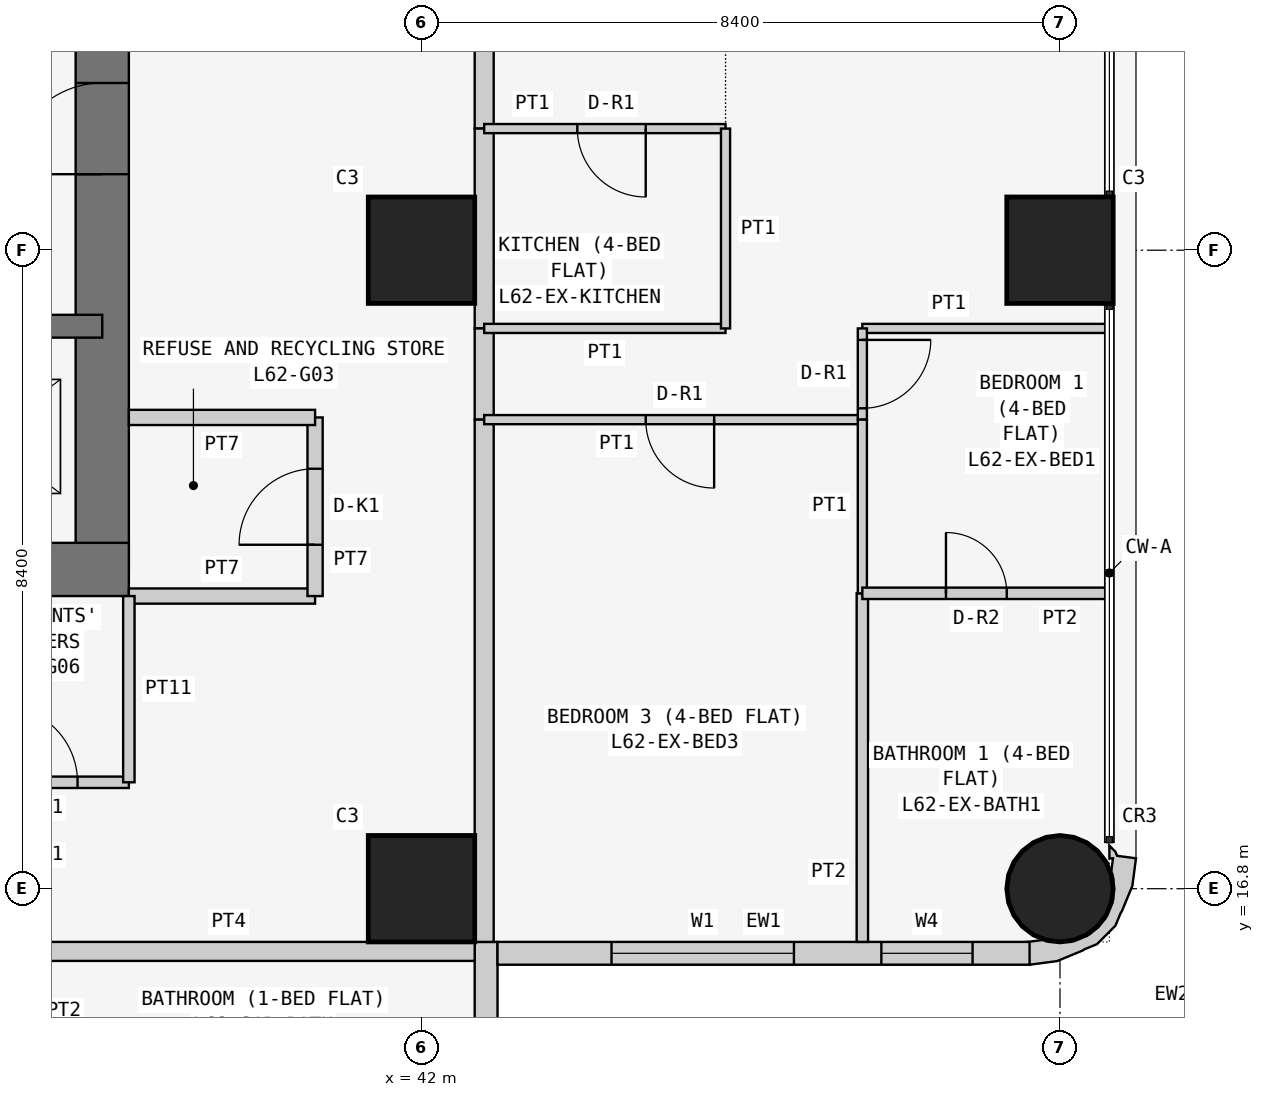
"""IFC4 building model, lengths in metres.
Left out: names, types, materials, properties, quantities, classifications, styles, units other than length and angle.
Written with IfcOpenShell. Run it as: python <this file> out.ifc"""

import sys

from ifc_helpers import new_model, si_unit, direction, frame, frame_2d, origin, origin_2d, place, context, subcontext, project, spatial, polyline, rectangle, circle, outline, extrude, element, fill, save


model = new_model("IFC4")
c1 = context("Model", 3, precision=1e-05, world=origin(), true_north=direction((0.0, 1.0)))
c2 = subcontext(c1, "Body", "Model", "MODEL_VIEW")
j1 = project(units=[si_unit("LENGTHUNIT", "METRE"), si_unit("PLANEANGLEUNIT", "RADIAN")], contexts=[c1])
p1 = place(None, origin())
s1 = spatial("IfcSite", under=j1, at=p1, CompositionType="ELEMENT")
p2 = place(p1, origin())
s2 = spatial("IfcBuilding", under=s1, at=p2, CompositionType="ELEMENT")
p3 = place(p2, frame((0.0, 0.0, 237.3)))
s3 = spatial("IfcBuildingStorey", under=s2, at=p3, CompositionType="ELEMENT", Elevation=237.3)
for number, where, z_axis, x_axis in (
    (1, (42.0, 16.8, 0.0), (0.0, 0.0, 1.0), (1.0, 0.0, 0.0)),
    (2, (42.0, 25.2, 0.0), (0.0, 0.0, 1.0), (1.0, 0.0, 0.0)),
):
    element("IfcColumn", number, at=place(p3, frame(where, z_axis=z_axis, x_axis=x_axis)), inside=s3, PredefinedType="COLUMN", context=c2, shape_type="SweptSolid", body=[
        extrude(rectangle(XDim=1.4, YDim=1.4, at=origin_2d()), origin(), (0.0, 0.0, 1.0), 3.6),
    ])
p4 = place(p3, frame((50.4, 16.8, 0.0), z_axis=(0.0, 0.0, 1.0), x_axis=(1.0, 0.0, 0.0)))
e3 = element("IfcColumn", 3, at=p4, inside=s3, PredefinedType="COLUMN", context=c2, shape_type="SweptSolid", body=[
    extrude(circle(Radius=0.7, at=origin_2d()), origin(), (0.0, 0.0, 1.0), 3.6),
])
p5 = place(p3, frame((50.4, 25.2, 0.0), z_axis=(0.0, 0.0, 1.0), x_axis=(1.0, 0.0, 0.0)))
e4 = element("IfcColumn", 4, at=p5, inside=s3, PredefinedType="COLUMN", context=c2, shape_type="SweptSolid", body=[
    extrude(rectangle(XDim=1.4, YDim=1.4, at=origin_2d()), origin(), (0.0, 0.0, 1.0), 3.6),
])
p6 = place(p3, frame((21.0, 21.0, 0.0), z_axis=(0.0, 0.0, 1.0), x_axis=(1.0, 0.0, 0.0)))
e5 = element("IfcWall", 5, at=p6, inside=s3, PredefinedType="SHEAR", context=c2, shape_type="SweptSolid", body=[
    extrude(rectangle(XDim=17.15, YDim=0.7, at=frame_2d((8.575, 0.0))), origin(), (0.0, 0.0, 1.0), 3.6),
])
p7 = place(p3, frame((37.8, 21.0, 0.0), z_axis=(0.0, 0.0, 1.0), x_axis=(0.0, 1.0, 0.0)))
e6 = element("IfcWall", 6, at=p7, inside=s3, PredefinedType="SHEAR", context=c2, shape_type="SweptSolid", body=[
    extrude(rectangle(XDim=17.15, YDim=0.7, at=frame_2d((8.575, 0.0))), origin(), (0.0, 0.0, 1.0), 3.6),
])
p8 = place(p7, frame((5.2, 0.0, 0.0)))
e7 = element("IfcOpeningElement", 7, at=p8, cuts=e6, PredefinedType="OPENING", context=c2, shape_type="SweptSolid", body=[
    extrude(rectangle(XDim=1.2, YDim=2.1, at=frame_2d((0.6, 1.05))), frame((0.0, 0.36, 0.0), z_axis=(0.0, -1.0, 0.0), x_axis=(1.0, 0.0, 0.0)), (0.0, 0.0, 1.0), 0.72),
])
p9 = place(p3, frame((26.6, 24.2, 0.0), z_axis=(0.0, 0.0, 1.0), x_axis=(1.0, 0.0, 0.0)))
e8 = element("IfcWall", 8, at=p9, inside=s3, PredefinedType="SHEAR", context=c2, shape_type="SweptSolid", body=[
    extrude(rectangle(XDim=11.2, YDim=0.3, at=frame_2d((5.6, 0.0))), origin(), (0.0, 0.0, 1.0), 3.6),
])
p10 = place(p9, frame((0.913, 0.0, 0.0)))
e9 = element("IfcOpeningElement", 9, at=p10, cuts=e8, PredefinedType="OPENING", context=c2, shape_type="SweptSolid", body=[
    extrude(rectangle(XDim=1.0, YDim=2.1, at=frame_2d((0.5, 1.05))), frame((0.0, 0.16, 0.0), z_axis=(0.0, -1.0, 0.0), x_axis=(1.0, 0.0, 0.0)), (0.0, 0.0, 1.0), 0.32),
])
p11 = place(p9, frame((3.75, 0.0, 0.0)))
e10 = element("IfcOpeningElement", 10, at=p11, cuts=e8, PredefinedType="OPENING", context=c2, shape_type="SweptSolid", body=[
    extrude(rectangle(XDim=0.9, YDim=2.1, at=frame_2d((0.45, 1.05))), frame((0.0, 0.16, 0.0), z_axis=(0.0, -1.0, 0.0), x_axis=(1.0, 0.0, 0.0)), (0.0, 0.0, 1.0), 0.32),
])
p12 = place(p9, frame((6.45, 0.0, 0.0)))
e11 = element("IfcOpeningElement", 11, at=p12, cuts=e8, PredefinedType="OPENING", context=c2, shape_type="SweptSolid", body=[
    extrude(rectangle(XDim=1.1, YDim=2.1, at=frame_2d((0.55, 1.05))), frame((0.0, 0.16, 0.0), z_axis=(0.0, -1.0, 0.0), x_axis=(1.0, 0.0, 0.0)), (0.0, 0.0, 1.0), 0.32),
])
p13 = place(p9, frame((9.1, 0.0, 0.0)))
e12 = element("IfcOpeningElement", 12, at=p13, cuts=e8, PredefinedType="OPENING", context=c2, shape_type="SweptSolid", body=[
    extrude(rectangle(XDim=1.1, YDim=2.1, at=frame_2d((0.55, 1.05))), frame((0.0, 0.16, 0.0), z_axis=(0.0, -1.0, 0.0), x_axis=(1.0, 0.0, 0.0)), (0.0, 0.0, 1.0), 0.32),
])
p14 = place(p3, frame((42.85, 8.8, 0.0), z_axis=(0.0, 0.0, 1.0), x_axis=(0.0, 1.0, 0.0)))
e13 = element("IfcWall", 13, at=p14, inside=s3, PredefinedType="SOLIDWALL", context=c2, shape_type="SweptSolid", body=[
    extrude(rectangle(XDim=7.3, YDim=0.3, at=frame_2d((3.65, 0.0))), origin(), (0.0, 0.0, 1.0), 3.45),
])
p15 = place(p14, frame((3.1, 0.0, 0.9)))
e14 = element("IfcOpeningElement", 14, at=p15, cuts=e13, PredefinedType="OPENING", context=c2, shape_type="SweptSolid", body=[
    extrude(rectangle(XDim=2.4, YDim=1.5, at=frame_2d((1.2, 0.75))), frame((0.0, 0.16, 0.0), z_axis=(0.0, -1.0, 0.0), x_axis=(1.0, 0.0, 0.0)), (0.0, 0.0, 1.0), 0.32),
])
p16 = place(p14, frame((0.75, 0.0, 0.9)))
e15 = element("IfcOpeningElement", 15, at=p16, cuts=e13, PredefinedType="OPENING", context=c2, shape_type="SweptSolid", body=[
    extrude(rectangle(XDim=1.2, YDim=1.5, at=frame_2d((0.6, 0.75))), frame((0.0, 0.16, 0.0), z_axis=(0.0, -1.0, 0.0), x_axis=(1.0, 0.0, 0.0)), (0.0, 0.0, 1.0), 0.32),
])
p17 = place(p3, frame((43.0, 15.95, 0.0), z_axis=(0.0, 0.0, 1.0), x_axis=(1.0, 0.0, 0.0)))
e16 = element("IfcWall", 16, at=p17, inside=s3, PredefinedType="SOLIDWALL", context=c2, shape_type="SweptSolid", body=[
    extrude(rectangle(XDim=7.0, YDim=0.3, at=frame_2d((3.5, 0.0))), origin(), (0.0, 0.0, 1.0), 3.45),
])
p18 = place(p17, frame((1.5, 0.0, 0.9)))
e17 = element("IfcOpeningElement", 17, at=p18, cuts=e16, PredefinedType="OPENING", context=c2, shape_type="SweptSolid", body=[
    extrude(rectangle(XDim=2.4, YDim=1.5, at=frame_2d((1.2, 0.75))), frame((0.0, 0.16, 0.0), z_axis=(0.0, -1.0, 0.0), x_axis=(1.0, 0.0, 0.0)), (0.0, 0.0, 1.0), 0.32),
])
p19 = place(p17, frame((5.05, 0.0, 0.9)))
e18 = element("IfcOpeningElement", 18, at=p19, cuts=e16, PredefinedType="OPENING", context=c2, shape_type="SweptSolid", body=[
    extrude(rectangle(XDim=1.2, YDim=1.5, at=frame_2d((0.6, 0.75))), frame((0.0, 0.16, 0.0), z_axis=(0.0, -1.0, 0.0), x_axis=(1.0, 0.0, 0.0)), (0.0, 0.0, 1.0), 0.32),
])
p20 = place(p3, frame((50.11, 16.076, 0.0), z_axis=(0.0, 0.0, 1.0), x_axis=(0.898030234854, -0.439933741929, 0.0)))
e19 = element("IfcWall", 19, at=p20, inside=s3, PredefinedType="SOLIDWALL", context=c2, shape_type="SweptSolid", body=[
    extrude(outline(polyline([(0.664, 1.577), (0.426, 1.497), (0.382, 1.536), (0.276, 1.572), (0.349, 1.423), (0.392, 1.444), (0.453, 1.261), (0.51, 1.211), (0.632, 0.961), (0.65, 0.683), (0.56, 0.419), (0.375, 0.21), (0.125, 0.087), (0.05, 0.082), (-0.128, -0.035), (-0.145, -0.044), (0.022, -0.296), (0.327, -0.094), (0.568, 0.18), (0.577, 0.199), (0.7, 0.337), (0.811, 0.661), (0.799, 0.846), (0.803, 0.866), (0.78, 1.231), (0.664, 1.577)])), origin(), (0.0, 0.0, 1.0), 3.45),
])
p21 = place(p3, frame((38.15, 20.65, 0.0), z_axis=(0.0, 0.0, 1.0), x_axis=(1.0, 0.0, 0.0)))
e20 = element("IfcWall", 20, at=p21, inside=s3, PredefinedType="PARTITIONING", context=c2, shape_type="SweptSolid", body=[
    extrude(rectangle(XDim=2.45, YDim=0.2, at=frame_2d((1.225, 0.0))), origin(), (0.0, 0.0, 1.0), 3.45),
])
p22 = place(p3, frame((40.6, 20.65, 0.0), z_axis=(0.0, 0.0, 1.0), x_axis=(0.0, 1.0, 0.0)))
e21 = element("IfcWall", 21, at=p22, inside=s3, PredefinedType="PARTITIONING", context=c2, shape_type="SweptSolid", body=[
    extrude(rectangle(XDim=2.35, YDim=0.2, at=frame_2d((1.175, 0.0))), origin(), (0.0, 0.0, 1.0), 3.45),
])
p23 = place(p22, frame((0.675, 0.0, 0.0)))
e22 = element("IfcOpeningElement", 22, at=p23, cuts=e21, PredefinedType="OPENING", context=c2, shape_type="SweptSolid", body=[
    extrude(rectangle(XDim=1.0, YDim=2.1, at=frame_2d((0.5, 1.05))), frame((0.0, 0.11, 0.0), z_axis=(0.0, -1.0, 0.0), x_axis=(1.0, 0.0, 0.0)), (0.0, 0.0, 1.0), 0.22),
])
p24 = place(p3, frame((40.6, 23.0, 0.0), z_axis=(0.0, 0.0, 1.0), x_axis=(-1.0, 0.0, 0.0)))
e23 = element("IfcWall", 23, at=p24, inside=s3, PredefinedType="PARTITIONING", context=c2, shape_type="SweptSolid", body=[
    extrude(rectangle(XDim=2.45, YDim=0.2, at=frame_2d((1.225, 0.0))), origin(), (0.0, 0.0, 1.0), 3.45),
])
p25 = place(p3, frame((35.8, 18.2, 0.0), z_axis=(0.0, 0.0, 1.0), x_axis=(1.0, 0.0, 0.0)))
e24 = element("IfcWall", 24, at=p25, inside=s3, PredefinedType="PARTITIONING", context=c2, shape_type="SweptSolid", body=[
    extrude(rectangle(XDim=2.35, YDim=0.15, at=frame_2d((1.175, 0.0))), origin(), (0.0, 0.0, 1.0), 3.45),
])
p26 = place(p25, frame((0.675, 0.0, 0.0)))
e25 = element("IfcOpeningElement", 25, at=p26, cuts=e24, PredefinedType="OPENING", context=c2, shape_type="SweptSolid", body=[
    extrude(rectangle(XDim=1.0, YDim=2.1, at=frame_2d((0.5, 1.05))), frame((0.0, 0.085, 0.0), z_axis=(0.0, -1.0, 0.0), x_axis=(1.0, 0.0, 0.0)), (0.0, 0.0, 1.0), 0.17),
])
p27 = place(p3, frame((38.15, 18.2, 0.0), z_axis=(0.0, 0.0, 1.0), x_axis=(0.0, 1.0, 0.0)))
e26 = element("IfcWall", 26, at=p27, inside=s3, PredefinedType="PARTITIONING", context=c2, shape_type="SweptSolid", body=[
    extrude(rectangle(XDim=2.45, YDim=0.15, at=frame_2d((1.225, 0.0))), origin(), (0.0, 0.0, 1.0), 3.45),
])
p28 = place(p3, frame((42.825, 32.0, 0.0), z_axis=(0.0, 0.0, 1.0), x_axis=(0.0, -1.0, 0.0)))
e27 = element("IfcWall", 27, at=p28, inside=s3, PredefinedType="PARTITIONING", context=c2, shape_type="SweptSolid", body=[
    extrude(rectangle(XDim=5.2, YDim=0.25, at=frame_2d((2.6, 0.0))), origin(), (0.0, 0.0, 1.0), 3.45),
])
p29 = place(p28, frame((2.1, 0.0, 0.0)))
e28 = element("IfcOpeningElement", 28, at=p29, cuts=e27, PredefinedType="OPENING", context=c2, shape_type="SweptSolid", body=[
    extrude(rectangle(XDim=1.0, YDim=2.1, at=frame_2d((0.5, 1.05))), frame((0.0, 0.135, 0.0), z_axis=(0.0, -1.0, 0.0), x_axis=(1.0, 0.0, 0.0)), (0.0, 0.0, 1.0), 0.27),
])
p30 = place(p3, frame((42.825, 26.8, 0.0), z_axis=(0.0, 0.0, 1.0), x_axis=(0.0, -1.0, 0.0)))
e29 = element("IfcWall", 29, at=p30, inside=s3, PredefinedType="PARTITIONING", context=c2, shape_type="SweptSolid", body=[
    extrude(rectangle(XDim=2.629, YDim=0.25, at=frame_2d((1.314, 0.0))), origin(), (0.0, 0.0, 1.0), 3.45),
])
p31 = place(p3, frame((42.825, 24.171, 0.0), z_axis=(0.0, 0.0, 1.0), x_axis=(0.0, -1.0, 0.0)))
e30 = element("IfcWall", 30, at=p31, inside=s3, PredefinedType="PARTITIONING", context=c2, shape_type="SweptSolid", body=[
    extrude(rectangle(XDim=1.2, YDim=0.25, at=frame_2d((0.6, 0.0))), origin(), (0.0, 0.0, 1.0), 3.45),
])
p32 = place(p3, frame((42.825, 22.971, 0.0), z_axis=(0.0, 0.0, 1.0), x_axis=(0.0, -1.0, 0.0)))
e31 = element("IfcWall", 31, at=p32, inside=s3, PredefinedType="PARTITIONING", context=c2, shape_type="SweptSolid", body=[
    extrude(rectangle(XDim=6.871, YDim=0.25, at=frame_2d((3.436, 0.0))), origin(), (0.0, 0.0, 1.0), 3.45),
])
p33 = place(p3, frame((42.7, 15.975, 0.0), z_axis=(0.0, 0.0, 1.0), x_axis=(-1.0, 0.0, 0.0)))
e32 = element("IfcWall", 32, at=p33, inside=s3, PredefinedType="PARTITIONING", context=c2, shape_type="SweptSolid", body=[
    extrude(rectangle(XDim=6.471, YDim=0.25, at=frame_2d((3.235, 0.0))), origin(), (0.0, 0.0, 1.0), 3.45),
])
p34 = place(p3, frame((42.825, 26.8, 0.0), z_axis=(0.0, 0.0, 1.0), x_axis=(1.0, 0.0, 0.0)))
e33 = element("IfcWall", 33, at=p34, inside=s3, PredefinedType="PARTITIONING", context=c2, shape_type="SweptSolid", body=[
    extrude(rectangle(XDim=3.175, YDim=0.12, at=frame_2d((1.587, 0.0))), origin(), (0.0, 0.0, 1.0), 3.45),
])
p35 = place(p34, frame((1.225, 0.0, 0.0)))
e34 = element("IfcOpeningElement", 34, at=p35, cuts=e33, PredefinedType="OPENING", context=c2, shape_type="SweptSolid", body=[
    extrude(rectangle(XDim=0.9, YDim=2.1, at=frame_2d((0.45, 1.05))), frame((0.0, 0.07, 0.0), z_axis=(0.0, -1.0, 0.0), x_axis=(1.0, 0.0, 0.0)), (0.0, 0.0, 1.0), 0.14),
])
p36 = place(p3, frame((42.825, 24.171, 0.0), z_axis=(0.0, 0.0, 1.0), x_axis=(1.0, 0.0, 0.0)))
e35 = element("IfcWall", 35, at=p36, inside=s3, PredefinedType="PARTITIONING", context=c2, shape_type="SweptSolid", body=[
    extrude(rectangle(XDim=3.175, YDim=0.12, at=frame_2d((1.587, 0.0))), origin(), (0.0, 0.0, 1.0), 3.45),
])
p37 = place(p3, frame((46.0, 24.171, 0.0), z_axis=(0.0, 0.0, 1.0), x_axis=(0.0, 1.0, 0.0)))
e36 = element("IfcWall", 36, at=p37, inside=s3, PredefinedType="PARTITIONING", context=c2, shape_type="SweptSolid", body=[
    extrude(rectangle(XDim=2.629, YDim=0.12, at=frame_2d((1.314, 0.0))), origin(), (0.0, 0.0, 1.0), 3.45),
])
p38 = place(p3, frame((47.8, 22.971, 0.0), z_axis=(0.0, 0.0, 1.0), x_axis=(-1.0, 0.0, 0.0)))
e37 = element("IfcWall", 37, at=p38, inside=s3, PredefinedType="PARTITIONING", context=c2, shape_type="SweptSolid", body=[
    extrude(rectangle(XDim=4.975, YDim=0.12, at=frame_2d((2.488, 0.0))), origin(), (0.0, 0.0, 1.0), 3.45),
])
p39 = place(p38, frame((1.95, 0.0, 0.0)))
e38 = element("IfcOpeningElement", 38, at=p39, cuts=e37, PredefinedType="OPENING", context=c2, shape_type="SweptSolid", body=[
    extrude(rectangle(XDim=0.9, YDim=2.1, at=frame_2d((0.45, 1.05))), frame((0.0, 0.07, 0.0), z_axis=(0.0, -1.0, 0.0), x_axis=(1.0, 0.0, 0.0)), (0.0, 0.0, 1.0), 0.14),
])
p40 = place(p3, frame((51.05, 24.171, 0.0), z_axis=(0.0, 0.0, 1.0), x_axis=(-1.0, 0.0, 0.0)))
e39 = element("IfcWall", 39, at=p40, inside=s3, PredefinedType="PARTITIONING", context=c2, shape_type="SweptSolid", body=[
    extrude(rectangle(XDim=3.25, YDim=0.12, at=frame_2d((1.625, 0.0))), origin(), (0.0, 0.0, 1.0), 3.45),
])
p41 = place(p3, frame((47.8, 24.171, 0.0), z_axis=(0.0, 0.0, 1.0), x_axis=(0.0, -1.0, 0.0)))
e40 = element("IfcWall", 40, at=p41, inside=s3, PredefinedType="PARTITIONING", context=c2, shape_type="SweptSolid", body=[
    extrude(rectangle(XDim=1.2, YDim=0.12, at=frame_2d((0.6, 0.0))), origin(), (0.0, 0.0, 1.0), 3.45),
])
p42 = place(p41, frame((0.151, 0.0, 0.0)))
e41 = element("IfcOpeningElement", 41, at=p42, cuts=e40, PredefinedType="OPENING", context=c2, shape_type="SweptSolid", body=[
    extrude(rectangle(XDim=0.9, YDim=2.1, at=frame_2d((0.45, 1.05))), frame((0.0, 0.07, 0.0), z_axis=(0.0, -1.0, 0.0), x_axis=(1.0, 0.0, 0.0)), (0.0, 0.0, 1.0), 0.14),
])
p43 = place(p3, frame((47.8, 16.1, 0.0), z_axis=(0.0, 0.0, 1.0), x_axis=(0.0, 1.0, 0.0)))
e42 = element("IfcWall", 42, at=p43, inside=s3, PredefinedType="PARTITIONING", context=c2, shape_type="SweptSolid", body=[
    extrude(rectangle(XDim=4.586, YDim=0.15, at=frame_2d((2.293, 0.0))), origin(), (0.0, 0.0, 1.0), 3.45),
])
p44 = place(p3, frame((47.8, 20.686, 0.0), z_axis=(0.0, 0.0, 1.0), x_axis=(0.0, 1.0, 0.0)))
e43 = element("IfcWall", 43, at=p44, inside=s3, PredefinedType="PARTITIONING", context=c2, shape_type="SweptSolid", body=[
    extrude(rectangle(XDim=2.285, YDim=0.12, at=frame_2d((1.143, 0.0))), origin(), (0.0, 0.0, 1.0), 3.45),
])
p45 = place(p3, frame((51.05, 20.686, 0.0), z_axis=(0.0, 0.0, 1.0), x_axis=(-1.0, 0.0, 0.0)))
e44 = element("IfcWall", 44, at=p45, inside=s3, PredefinedType="PARTITIONING", context=c2, shape_type="SweptSolid", body=[
    extrude(rectangle(XDim=3.25, YDim=0.15, at=frame_2d((1.625, 0.0))), origin(), (0.0, 0.0, 1.0), 3.45),
])
p46 = place(p45, frame((1.35, 0.0, 0.0)))
e45 = element("IfcOpeningElement", 45, at=p46, cuts=e44, PredefinedType="OPENING", context=c2, shape_type="SweptSolid", body=[
    extrude(rectangle(XDim=0.8, YDim=2.1, at=frame_2d((0.4, 1.05))), frame((0.0, 0.085, 0.0), z_axis=(0.0, -1.0, 0.0), x_axis=(1.0, 0.0, 0.0)), (0.0, 0.0, 1.0), 0.17),
])
p47 = place(p18, origin())
e46 = element("IfcWindow", 46, at=p47, inside=s3, PartitioningType="SINGLE_PANEL", PredefinedType="WINDOW", context=c2, shape_type="SweptSolid", body=[
    extrude(rectangle(XDim=2.4, YDim=1.5, at=frame_2d((1.2, 0.75))), frame((0.0, 0.03, 0.0), z_axis=(0.0, -1.0, 0.0), x_axis=(1.0, 0.0, 0.0)), (0.0, 0.0, 1.0), 0.06),
])
fill(e17, e46)
p48 = place(p19, origin())
e47 = element("IfcWindow", 47, at=p48, inside=s3, PartitioningType="SINGLE_PANEL", PredefinedType="WINDOW", context=c2, shape_type="SweptSolid", body=[
    extrude(rectangle(XDim=1.2, YDim=1.5, at=frame_2d((0.6, 0.75))), frame((0.0, 0.03, 0.0), z_axis=(0.0, -1.0, 0.0), x_axis=(1.0, 0.0, 0.0)), (0.0, 0.0, 1.0), 0.06),
])
fill(e18, e47)
p49 = place(p23, origin())
e48 = element("IfcDoor", 48, at=p49, inside=s3, OperationType="SINGLE_SWING_LEFT", PredefinedType="DOOR", context=c2, shape_type="SweptSolid", body=[
    extrude(rectangle(XDim=1.0, YDim=2.1, at=frame_2d((0.5, 1.05))), frame((0.0, 0.025, 0.0), z_axis=(0.0, -1.0, 0.0), x_axis=(1.0, 0.0, 0.0)), (0.0, 0.0, 1.0), 0.05),
])
fill(e22, e48)
p50 = place(p26, origin())
e49 = element("IfcDoor", 49, at=p50, inside=s3, OperationType="SINGLE_SWING_LEFT", PredefinedType="DOOR", context=c2, shape_type="SweptSolid", body=[
    extrude(rectangle(XDim=1.0, YDim=2.1, at=frame_2d((0.5, 1.05))), frame((0.0, 0.025, 0.0), z_axis=(0.0, -1.0, 0.0), x_axis=(1.0, 0.0, 0.0)), (0.0, 0.0, 1.0), 0.05),
])
fill(e25, e49)
p51 = place(p35, frame((0.9, 0.0, 0.0), z_axis=(0.0, 0.0, 1.0), x_axis=(-1.0, 0.0, 0.0)))
e50 = element("IfcDoor", 50, at=p51, inside=s3, OperationType="SINGLE_SWING_LEFT", PredefinedType="DOOR", context=c2, shape_type="SweptSolid", body=[
    extrude(rectangle(XDim=0.9, YDim=2.1, at=frame_2d((0.45, 1.05))), frame((0.0, 0.025, 0.0), z_axis=(0.0, -1.0, 0.0), x_axis=(1.0, 0.0, 0.0)), (0.0, 0.0, 1.0), 0.05),
])
fill(e34, e50)
p52 = place(p39, origin())
e51 = element("IfcDoor", 51, at=p52, inside=s3, OperationType="SINGLE_SWING_LEFT", PredefinedType="DOOR", context=c2, shape_type="SweptSolid", body=[
    extrude(rectangle(XDim=0.9, YDim=2.1, at=frame_2d((0.45, 1.05))), frame((0.0, 0.025, 0.0), z_axis=(0.0, -1.0, 0.0), x_axis=(1.0, 0.0, 0.0)), (0.0, 0.0, 1.0), 0.05),
])
fill(e38, e51)
p53 = place(p42, origin())
e52 = element("IfcDoor", 52, at=p53, inside=s3, OperationType="SINGLE_SWING_LEFT", PredefinedType="DOOR", context=c2, shape_type="SweptSolid", body=[
    extrude(rectangle(XDim=0.9, YDim=2.1, at=frame_2d((0.45, 1.05))), frame((0.0, 0.025, 0.0), z_axis=(0.0, -1.0, 0.0), x_axis=(1.0, 0.0, 0.0)), (0.0, 0.0, 1.0), 0.05),
])
fill(e41, e52)
p54 = place(p46, frame((0.8, 0.0, 0.0), z_axis=(0.0, 0.0, 1.0), x_axis=(-1.0, 0.0, 0.0)))
e53 = element("IfcDoor", 53, at=p54, inside=s3, OperationType="SINGLE_SWING_LEFT", PredefinedType="DOOR", context=c2, shape_type="SweptSolid", body=[
    extrude(rectangle(XDim=0.8, YDim=2.1, at=frame_2d((0.4, 1.05))), frame((0.0, 0.025, 0.0), z_axis=(0.0, -1.0, 0.0), x_axis=(1.0, 0.0, 0.0)), (0.0, 0.0, 1.0), 0.05),
])
fill(e45, e53)
p55 = place(p8, origin())
e54 = element("IfcDoor", 54, at=p55, inside=s3, OperationType="SINGLE_SWING_LEFT", PredefinedType="DOOR", context=c2, shape_type="SweptSolid", body=[
    extrude(rectangle(XDim=1.2, YDim=2.1, at=frame_2d((0.6, 1.05))), frame((0.0, 0.025, 0.0), z_axis=(0.0, -1.0, 0.0), x_axis=(1.0, 0.0, 0.0)), (0.0, 0.0, 1.0), 0.05),
])
fill(e7, e54)
save(model, sys.argv[1])
